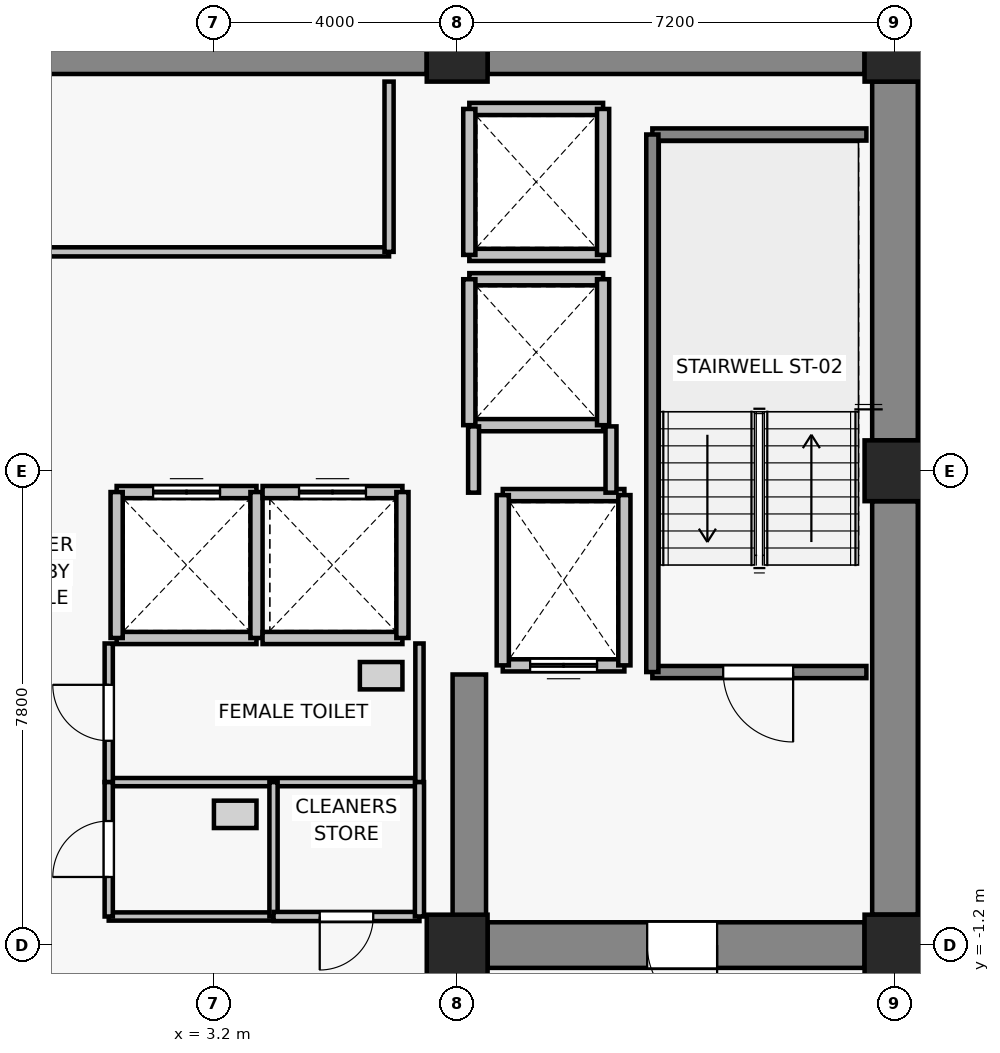
"""IFC4 building model, lengths in metres.
Left out: names, types, materials, properties, quantities, classifications, styles, units other than length and angle.
Written with IfcOpenShell. Run it as: python <this file> out.ifc"""

import sys

from ifc_helpers import new_model, si_unit, direction, frame, frame_2d, origin, origin_2d, place, context, subcontext, project, spatial, rectangle, extrude, source, transform, mapped, element, fill, save


model = new_model("IFC4")
c1 = context("Model", 3, precision=1e-05, world=origin(), true_north=direction((0.0, 1.0)))
c2 = subcontext(c1, "Body", "Model", "MODEL_VIEW")
j1 = project(units=[si_unit("LENGTHUNIT", "METRE"), si_unit("PLANEANGLEUNIT", "RADIAN")], contexts=[c1])
p1 = place(None, origin())
s1 = spatial("IfcSite", under=j1, at=p1, CompositionType="ELEMENT")
p2 = place(p1, origin())
s2 = spatial("IfcBuilding", under=s1, at=p2, CompositionType="ELEMENT")
p3 = place(p2, frame((0.0, 0.0, 185.8)))
s3 = spatial("IfcBuildingStorey", under=s2, at=p3, CompositionType="ELEMENT", Elevation=185.8)
for number, where, z_axis, x_axis in (
    (1, (7.2, -1.2, 0.0), (0.0, 0.0, 1.0), (1.0, 0.0, 0.0)),
    (2, (14.4, -1.2, 0.0), (0.0, 0.0, 1.0), (1.0, 0.0, 0.0)),
    (3, (14.4, 6.6, 0.0), (0.0, 0.0, 1.0), (1.0, 0.0, 0.0)),
    (4, (7.2, 13.5, 0.0), (0.0, 0.0, 1.0), (1.0, 0.0, 0.0)),
    (5, (14.4, 13.5, 0.0), (0.0, 0.0, 1.0), (1.0, 0.0, 0.0)),
):
    element("IfcColumn", number, at=place(p3, frame(where, z_axis=z_axis, x_axis=x_axis)), inside=s3, PredefinedType="COLUMN", context=c2, shape_type="SweptSolid", body=[
        extrude(rectangle(XDim=1.0, YDim=1.0, at=origin_2d()), origin(), (0.0, 0.0, 1.0), 3.3),
    ])
p4 = place(p3, frame((-6.7, 13.5, 0.0), z_axis=(0.0, 0.0, 1.0), x_axis=(1.0, 0.0, 0.0)))
e6 = element("IfcWall", 6, at=p4, inside=s3, PredefinedType="SHEAR", context=c2, shape_type="SweptSolid", body=[
    extrude(rectangle(XDim=13.4, YDim=0.75, at=frame_2d((6.7, 0.0))), origin(), (0.0, 0.0, 1.0), 3.075),
])
p5 = place(p3, frame((7.7, 13.5, 0.0), z_axis=(0.0, 0.0, 1.0), x_axis=(1.0, 0.0, 0.0)))
e7 = element("IfcWall", 7, at=p5, inside=s3, PredefinedType="SHEAR", context=c2, shape_type="SweptSolid", body=[
    extrude(rectangle(XDim=6.2, YDim=0.75, at=frame_2d((3.1, 0.0))), origin(), (0.0, 0.0, 1.0), 3.075),
])
p6 = place(p3, frame((14.4, -0.7, 0.0), z_axis=(0.0, 0.0, 1.0), x_axis=(0.0, 1.0, 0.0)))
e8 = element("IfcWall", 8, at=p6, inside=s3, PredefinedType="SHEAR", context=c2, shape_type="SweptSolid", body=[
    extrude(rectangle(XDim=6.8, YDim=0.75, at=frame_2d((3.4, 0.0))), origin(), (0.0, 0.0, 1.0), 3.075),
])
p7 = place(p3, frame((14.4, 7.1, 0.0), z_axis=(0.0, 0.0, 1.0), x_axis=(0.0, 1.0, 0.0)))
e9 = element("IfcWall", 9, at=p7, inside=s3, PredefinedType="SHEAR", context=c2, shape_type="SweptSolid", body=[
    extrude(rectangle(XDim=5.9, YDim=0.75, at=frame_2d((2.95, 0.0))), origin(), (0.0, 0.0, 1.0), 3.075),
])
p8 = place(p3, frame((13.9, -1.2, 0.0), z_axis=(0.0, 0.0, 1.0), x_axis=(-1.0, 0.0, 0.0)))
e10 = element("IfcWall", 10, at=p8, inside=s3, PredefinedType="SHEAR", context=c2, shape_type="SweptSolid", body=[
    extrude(rectangle(XDim=6.2, YDim=0.75, at=frame_2d((3.1, 0.0))), origin(), (0.0, 0.0, 1.0), 3.075),
])
p9 = place(p8, frame((2.425, 0.0, 0.0)))
e11 = element("IfcOpeningElement", 11, at=p9, cuts=e10, PredefinedType="OPENING", context=c2, shape_type="SweptSolid", body=[
    extrude(rectangle(XDim=1.15, YDim=2.15, at=frame_2d((0.575, 1.075))), frame((0.0, 0.385, 0.0), z_axis=(0.0, -1.0, 0.0), x_axis=(1.0, 0.0, 0.0)), (0.0, 0.0, 1.0), 0.77),
])
p10 = place(p3, frame((7.4, -0.825, 0.0), z_axis=(0.0, 0.0, 1.0), x_axis=(0.0, 1.0, 0.0)))
e12 = element("IfcWall", 12, at=p10, inside=s3, PredefinedType="SHEAR", context=c2, shape_type="SweptSolid", body=[
    extrude(rectangle(XDim=4.075, YDim=0.55, at=frame_2d((2.038, 0.0))), origin(), (0.0, 0.0, 1.0), 3.075),
])
p11 = place(p3, frame((9.95, 3.4, 0.0), z_axis=(0.0, 0.0, 1.0), x_axis=(-1.0, 0.0, 0.0)))
e13 = element("IfcWall", 13, at=p11, inside=s3, PredefinedType="SOLIDWALL", context=c2, shape_type="SweptSolid", body=[
    extrude(rectangle(XDim=2.0, YDim=0.2, at=frame_2d((1.0, 0.0))), origin(), (0.0, 0.0, 1.0), 3.075),
])
p12 = place(p11, frame((0.45, 0.0, 0.0)))
e14 = element("IfcOpeningElement", 14, at=p12, cuts=e13, PredefinedType="OPENING", context=c2, shape_type="SweptSolid", body=[
    extrude(rectangle(XDim=1.1, YDim=2.2, at=frame_2d((0.55, 1.1))), frame((0.0, 0.11, 0.0), z_axis=(0.0, -1.0, 0.0), x_axis=(1.0, 0.0, 0.0)), (0.0, 0.0, 1.0), 0.22),
])
p13 = place(p3, frame((7.95, 6.2, 0.0), z_axis=(0.0, 0.0, 1.0), x_axis=(1.0, 0.0, 0.0)))
e15 = element("IfcWall", 15, at=p13, inside=s3, PredefinedType="SOLIDWALL", context=c2, shape_type="SweptSolid", body=[
    extrude(rectangle(XDim=2.0, YDim=0.2, at=frame_2d((1.0, 0.0))), origin(), (0.0, 0.0, 1.0), 3.075),
])
for number, where, z_axis, x_axis in (
    (16, (7.95, 3.4, 0.0), (0.0, 0.0, 1.0), (0.0, 1.0, 0.0)),
    (17, (9.95, 6.2, 0.0), (0.0, 0.0, 1.0), (0.0, -1.0, 0.0)),
):
    element("IfcWall", number, at=place(p3, frame(where, z_axis=z_axis, x_axis=x_axis)), inside=s3, PredefinedType="SOLIDWALL", context=c2, shape_type="SweptSolid", body=[
        extrude(rectangle(XDim=2.8, YDim=0.2, at=frame_2d((1.4, 0.0))), origin(), (0.0, 0.0, 1.0), 3.075),
    ])
p14 = place(p3, frame((3.9, 3.85, 0.0), z_axis=(0.0, 0.0, 1.0), x_axis=(-1.0, 0.0, 0.0)))
e18 = element("IfcWall", 18, at=p14, inside=s3, PredefinedType="SOLIDWALL", context=c2, shape_type="SweptSolid", body=[
    extrude(rectangle(XDim=2.3, YDim=0.2, at=frame_2d((1.15, 0.0))), origin(), (0.0, 0.0, 1.0), 3.075),
])
p15 = place(p3, frame((1.6, 6.25, 0.0), z_axis=(0.0, 0.0, 1.0), x_axis=(1.0, 0.0, 0.0)))
e19 = element("IfcWall", 19, at=p15, inside=s3, PredefinedType="SOLIDWALL", context=c2, shape_type="SweptSolid", body=[
    extrude(rectangle(XDim=2.3, YDim=0.2, at=frame_2d((1.15, 0.0))), origin(), (0.0, 0.0, 1.0), 3.075),
])
p16 = place(p15, frame((0.6, 0.0, 0.0)))
e20 = element("IfcOpeningElement", 20, at=p16, cuts=e19, PredefinedType="OPENING", context=c2, shape_type="SweptSolid", body=[
    extrude(rectangle(XDim=1.1, YDim=2.2, at=frame_2d((0.55, 1.1))), frame((0.0, 0.11, 0.0), z_axis=(0.0, -1.0, 0.0), x_axis=(1.0, 0.0, 0.0)), (0.0, 0.0, 1.0), 0.22),
])
for number, where, z_axis, x_axis in (
    (21, (1.6, 3.85, 0.0), (0.0, 0.0, 1.0), (0.0, 1.0, 0.0)),
    (22, (3.9, 6.25, 0.0), (0.0, 0.0, 1.0), (0.0, -1.0, 0.0)),
):
    element("IfcWall", number, at=place(p3, frame(where, z_axis=z_axis, x_axis=x_axis)), inside=s3, PredefinedType="SOLIDWALL", context=c2, shape_type="SweptSolid", body=[
        extrude(rectangle(XDim=2.4, YDim=0.2, at=frame_2d((1.2, 0.0))), origin(), (0.0, 0.0, 1.0), 3.075),
    ])
p17 = place(p3, frame((6.3, 3.85, 0.0), z_axis=(0.0, 0.0, 1.0), x_axis=(-1.0, 0.0, 0.0)))
e23 = element("IfcWall", 23, at=p17, inside=s3, PredefinedType="SOLIDWALL", context=c2, shape_type="SweptSolid", body=[
    extrude(rectangle(XDim=2.3, YDim=0.2, at=frame_2d((1.15, 0.0))), origin(), (0.0, 0.0, 1.0), 3.075),
])
p18 = place(p3, frame((4.0, 6.25, 0.0), z_axis=(0.0, 0.0, 1.0), x_axis=(1.0, 0.0, 0.0)))
e24 = element("IfcWall", 24, at=p18, inside=s3, PredefinedType="SOLIDWALL", context=c2, shape_type="SweptSolid", body=[
    extrude(rectangle(XDim=2.3, YDim=0.2, at=frame_2d((1.15, 0.0))), origin(), (0.0, 0.0, 1.0), 3.075),
])
p19 = place(p18, frame((0.6, 0.0, 0.0)))
e25 = element("IfcOpeningElement", 25, at=p19, cuts=e24, PredefinedType="OPENING", context=c2, shape_type="SweptSolid", body=[
    extrude(rectangle(XDim=1.1, YDim=2.2, at=frame_2d((0.55, 1.1))), frame((0.0, 0.11, 0.0), z_axis=(0.0, -1.0, 0.0), x_axis=(1.0, 0.0, 0.0)), (0.0, 0.0, 1.0), 0.22),
])
p20 = place(p3, frame((6.3, 6.25, 0.0), z_axis=(0.0, 0.0, 1.0), x_axis=(0.0, -1.0, 0.0)))
e26 = element("IfcWall", 26, at=p20, inside=s3, PredefinedType="SOLIDWALL", context=c2, shape_type="SweptSolid", body=[
    extrude(rectangle(XDim=2.4, YDim=0.2, at=frame_2d((1.2, 0.0))), origin(), (0.0, 0.0, 1.0), 3.075),
])
for number, where, z_axis, x_axis in (
    (27, (9.6, 7.35, 0.0), (0.0, 0.0, 1.0), (-1.0, 0.0, 0.0)),
    (28, (7.4, 9.75, 0.0), (0.0, 0.0, 1.0), (1.0, 0.0, 0.0)),
):
    element("IfcWall", number, at=place(p3, frame(where, z_axis=z_axis, x_axis=x_axis)), inside=s3, PredefinedType="SOLIDWALL", context=c2, shape_type="SweptSolid", body=[
        extrude(rectangle(XDim=2.2, YDim=0.2, at=frame_2d((1.1, 0.0))), origin(), (0.0, 0.0, 1.0), 2.565),
    ])
p21 = place(p3, frame((7.4, 7.35, 0.0), z_axis=(0.0, 0.0, 1.0), x_axis=(0.0, 1.0, 0.0)))
e29 = element("IfcWall", 29, at=p21, inside=s3, PredefinedType="SOLIDWALL", context=c2, shape_type="SweptSolid", body=[
    extrude(rectangle(XDim=2.4, YDim=0.2, at=frame_2d((1.2, 0.0))), origin(), (0.0, 0.0, 1.0), 2.565),
])
p22 = place(p3, frame((9.6, 9.75, 0.0), z_axis=(0.0, 0.0, 1.0), x_axis=(0.0, -1.0, 0.0)))
e30 = element("IfcWall", 30, at=p22, inside=s3, PredefinedType="SOLIDWALL", context=c2, shape_type="SweptSolid", body=[
    extrude(rectangle(XDim=2.4, YDim=0.2, at=frame_2d((1.2, 0.0))), origin(), (0.0, 0.0, 1.0), 3.075),
])
for number, where, z_axis, x_axis in (
    (31, (9.6, 10.15, 0.0), (0.0, 0.0, 1.0), (-1.0, 0.0, 0.0)),
    (32, (7.4, 12.55, 0.0), (0.0, 0.0, 1.0), (1.0, 0.0, 0.0)),
):
    element("IfcWall", number, at=place(p3, frame(where, z_axis=z_axis, x_axis=x_axis)), inside=s3, PredefinedType="SOLIDWALL", context=c2, shape_type="SweptSolid", body=[
        extrude(rectangle(XDim=2.2, YDim=0.2, at=frame_2d((1.1, 0.0))), origin(), (0.0, 0.0, 1.0), 2.565),
    ])
p23 = place(p3, frame((7.4, 10.15, 0.0), z_axis=(0.0, 0.0, 1.0), x_axis=(0.0, 1.0, 0.0)))
e33 = element("IfcWall", 33, at=p23, inside=s3, PredefinedType="SOLIDWALL", context=c2, shape_type="SweptSolid", body=[
    extrude(rectangle(XDim=2.4, YDim=0.2, at=frame_2d((1.2, 0.0))), origin(), (0.0, 0.0, 1.0), 2.565),
])
p24 = place(p3, frame((9.6, 12.55, 0.0), z_axis=(0.0, 0.0, 1.0), x_axis=(0.0, -1.0, 0.0)))
e34 = element("IfcWall", 34, at=p24, inside=s3, PredefinedType="SOLIDWALL", context=c2, shape_type="SweptSolid", body=[
    extrude(rectangle(XDim=2.4, YDim=0.2, at=frame_2d((1.2, 0.0))), origin(), (0.0, 0.0, 1.0), 3.075),
])
p25 = place(p3, frame((13.93, 3.29, 0.0), z_axis=(0.0, 0.0, 1.0), x_axis=(-1.0, 0.0, 0.0)))
e35 = element("IfcWall", 35, at=p25, inside=s3, PredefinedType="SOLIDWALL", context=c2, shape_type="SweptSolid", body=[
    extrude(rectangle(XDim=3.52, YDim=0.2, at=frame_2d((1.76, 0.0))), origin(), (0.0, 0.0, 1.0), 3.075),
])
p26 = place(p25, frame((1.205, 0.0, 0.0)))
e36 = element("IfcOpeningElement", 36, at=p26, cuts=e35, PredefinedType="OPENING", context=c2, shape_type="SweptSolid", body=[
    extrude(rectangle(XDim=1.15, YDim=2.15, at=frame_2d((0.575, 1.075))), frame((0.0, 0.11, 0.0), z_axis=(0.0, -1.0, 0.0), x_axis=(1.0, 0.0, 0.0)), (0.0, 0.0, 1.0), 0.22),
])
p27 = place(p3, frame((10.41, 12.13, 0.0), z_axis=(0.0, 0.0, 1.0), x_axis=(1.0, 0.0, 0.0)))
e37 = element("IfcWall", 37, at=p27, inside=s3, PredefinedType="SOLIDWALL", context=c2, shape_type="SweptSolid", body=[
    extrude(rectangle(XDim=3.52, YDim=0.2, at=frame_2d((1.76, 0.0))), origin(), (0.0, 0.0, 1.0), 3.075),
])
p28 = place(p3, frame((10.41, 3.29, 0.0), z_axis=(0.0, 0.0, 1.0), x_axis=(0.0, 1.0, 0.0)))
e38 = element("IfcWall", 38, at=p28, inside=s3, PredefinedType="SOLIDWALL", context=c2, shape_type="SweptSolid", body=[
    extrude(rectangle(XDim=8.84, YDim=0.2, at=frame_2d((4.42, 0.0))), origin(), (0.0, 0.0, 1.0), 3.075),
])
p29 = place(p3, frame((7.47, 6.24, 0.0), z_axis=(0.0, 0.0, 1.0), x_axis=(0.0, 1.0, 0.0)))
e39 = element("IfcWall", 39, at=p29, inside=s3, PredefinedType="PARTITIONING", context=c2, shape_type="SweptSolid", body=[
    extrude(rectangle(XDim=1.09, YDim=0.18, at=frame_2d((0.545, 0.0))), origin(), (0.0, 0.0, 1.0), 2.565),
])
p30 = place(p3, frame((9.73, 7.33, 0.0), z_axis=(0.0, 0.0, 1.0), x_axis=(0.0, -1.0, 0.0)))
e40 = element("IfcWall", 40, at=p30, inside=s3, PredefinedType="PARTITIONING", context=c2, shape_type="SweptSolid", body=[
    extrude(rectangle(XDim=1.09, YDim=0.18, at=frame_2d((0.545, 0.0))), origin(), (0.0, 0.0, 1.0), 3.075),
])
p31 = place(p3, frame((6.08, 10.2, 0.0), z_axis=(0.0, 0.0, 1.0), x_axis=(-1.0, 0.0, 0.0)))
e41 = element("IfcWall", 41, at=p31, inside=s3, PredefinedType="PARTITIONING", context=c2, shape_type="SweptSolid", body=[
    extrude(rectangle(XDim=12.16, YDim=0.15, at=frame_2d((6.08, 0.0))), origin(), (0.0, 0.0, 1.0), 3.075),
])
p32 = place(p31, frame((7.005, 0.0, 0.0)))
e42 = element("IfcOpeningElement", 42, at=p32, cuts=e41, PredefinedType="OPENING", context=c2, shape_type="SweptSolid", body=[
    extrude(rectangle(XDim=1.15, YDim=2.15, at=frame_2d((0.575, 1.075))), frame((0.0, 0.085, 0.0), z_axis=(0.0, -1.0, 0.0), x_axis=(1.0, 0.0, 0.0)), (0.0, 0.0, 1.0), 0.17),
])
p33 = place(p3, frame((6.08, 13.0, 0.0), z_axis=(0.0, 0.0, 1.0), x_axis=(0.0, -1.0, 0.0)))
e43 = element("IfcWall", 43, at=p33, inside=s3, PredefinedType="PARTITIONING", context=c2, shape_type="SweptSolid", body=[
    extrude(rectangle(XDim=2.8, YDim=0.15, at=frame_2d((1.4, 0.0))), origin(), (0.0, 0.0, 1.0), 3.075),
])
p34 = place(p3, frame((6.58, 1.48, 0.0), z_axis=(0.0, 0.0, 1.0), x_axis=(-1.0, 0.0, 0.0)))
e44 = element("IfcWall", 44, at=p34, inside=s3, PredefinedType="PARTITIONING", context=c2, shape_type="SweptSolid", body=[
    extrude(rectangle(XDim=5.11, YDim=0.135, at=frame_2d((2.555, 0.0))), origin(), (0.0, 0.0, 1.0), 3.075),
])
p35 = place(p3, frame((1.47, 1.48, 0.0), z_axis=(0.0, 0.0, 1.0), x_axis=(0.0, 1.0, 0.0)))
e45 = element("IfcWall", 45, at=p35, inside=s3, PredefinedType="PARTITIONING", context=c2, shape_type="SweptSolid", body=[
    extrude(rectangle(XDim=2.28, YDim=0.135, at=frame_2d((1.14, 0.0))), origin(), (0.0, 0.0, 1.0), 3.075),
])
p36 = place(p35, frame((0.68, 0.0, 0.0)))
e46 = element("IfcOpeningElement", 46, at=p36, cuts=e45, PredefinedType="OPENING", context=c2, shape_type="SweptSolid", body=[
    extrude(rectangle(XDim=0.92, YDim=2.1, at=frame_2d((0.46, 1.05))), frame((0.0, 0.077, 0.0), z_axis=(0.0, -1.0, 0.0), x_axis=(1.0, 0.0, 0.0)), (0.0, 0.0, 1.0), 0.155),
])
p37 = place(p3, frame((6.58, 3.76, 0.0), z_axis=(0.0, 0.0, 1.0), x_axis=(0.0, -1.0, 0.0)))
e47 = element("IfcWall", 47, at=p37, inside=s3, PredefinedType="PARTITIONING", context=c2, shape_type="SweptSolid", body=[
    extrude(rectangle(XDim=2.28, YDim=0.135, at=frame_2d((1.14, 0.0))), origin(), (0.0, 0.0, 1.0), 3.075),
])
p38 = place(p3, frame((4.18, -0.73, 0.0), z_axis=(0.0, 0.0, 1.0), x_axis=(-1.0, 0.0, 0.0)))
e48 = element("IfcWall", 48, at=p38, inside=s3, PredefinedType="PARTITIONING", context=c2, shape_type="SweptSolid", body=[
    extrude(rectangle(XDim=2.71, YDim=0.135, at=frame_2d((1.355, 0.0))), origin(), (0.0, 0.0, 1.0), 3.075),
])
p39 = place(p3, frame((1.47, -0.73, 0.0), z_axis=(0.0, 0.0, 1.0), x_axis=(0.0, 1.0, 0.0)))
e49 = element("IfcWall", 49, at=p39, inside=s3, PredefinedType="PARTITIONING", context=c2, shape_type="SweptSolid", body=[
    extrude(rectangle(XDim=2.21, YDim=0.135, at=frame_2d((1.105, 0.0))), origin(), (0.0, 0.0, 1.0), 3.075),
])
p40 = place(p39, frame((0.65, 0.0, 0.0)))
e50 = element("IfcOpeningElement", 50, at=p40, cuts=e49, PredefinedType="OPENING", context=c2, shape_type="SweptSolid", body=[
    extrude(rectangle(XDim=0.92, YDim=2.1, at=frame_2d((0.46, 1.05))), frame((0.0, 0.077, 0.0), z_axis=(0.0, -1.0, 0.0), x_axis=(1.0, 0.0, 0.0)), (0.0, 0.0, 1.0), 0.155),
])
p41 = place(p3, frame((4.18, 1.48, 0.0), z_axis=(0.0, 0.0, 1.0), x_axis=(0.0, -1.0, 0.0)))
e51 = element("IfcWall", 51, at=p41, inside=s3, PredefinedType="PARTITIONING", context=c2, shape_type="SweptSolid", body=[
    extrude(rectangle(XDim=2.21, YDim=0.135, at=frame_2d((1.105, 0.0))), origin(), (0.0, 0.0, 1.0), 3.075),
])
p42 = place(p3, frame((6.58, -0.73, 0.0), z_axis=(0.0, 0.0, 1.0), x_axis=(-1.0, 0.0, 0.0)))
e52 = element("IfcWall", 52, at=p42, inside=s3, PredefinedType="PARTITIONING", context=c2, shape_type="SweptSolid", body=[
    extrude(rectangle(XDim=2.4, YDim=0.15, at=frame_2d((1.2, 0.0))), origin(), (0.0, 0.0, 1.0), 3.075),
])
p43 = place(p42, frame((0.76, 0.0, 0.0)))
e53 = element("IfcOpeningElement", 53, at=p43, cuts=e52, PredefinedType="OPENING", context=c2, shape_type="SweptSolid", body=[
    extrude(rectangle(XDim=0.88, YDim=2.1, at=frame_2d((0.44, 1.05))), frame((0.0, 0.085, 0.0), z_axis=(0.0, -1.0, 0.0), x_axis=(1.0, 0.0, 0.0)), (0.0, 0.0, 1.0), 0.17),
])
p44 = place(p3, frame((6.58, 1.48, 0.0), z_axis=(0.0, 0.0, 1.0), x_axis=(0.0, -1.0, 0.0)))
e54 = element("IfcWall", 54, at=p44, inside=s3, PredefinedType="PARTITIONING", context=c2, shape_type="SweptSolid", body=[
    extrude(rectangle(XDim=2.21, YDim=0.15, at=frame_2d((1.105, 0.0))), origin(), (0.0, 0.0, 1.0), 3.075),
])
m1 = source(origin(), c2, "Body", "SweptSolid", [
    extrude(rectangle(XDim=1.1, YDim=2.2, at=frame_2d((0.55, 1.1))), frame((0.0, 0.025, 0.0), z_axis=(0.0, -1.0, 0.0), x_axis=(1.0, 0.0, 0.0)), (0.0, 0.0, 1.0), 0.05),
])
p45 = place(p12, origin())
e55 = element("IfcDoor", 55, at=p45, inside=s3, OperationType="DOUBLE_DOOR_SLIDING", PredefinedType="DOOR", context=c2, shape_type="MappedRepresentation", body=[
    mapped(m1, transform((0.0, 0.0, 0.0), x_axis=(1.0, 0.0, 0.0), y_axis=(0.0, 1.0, 0.0), z_axis=(0.0, 0.0, 1.0), scale=1.0)),
])
fill(e14, e55)
p46 = place(p16, origin())
e56 = element("IfcDoor", 56, at=p46, inside=s3, OperationType="DOUBLE_DOOR_SLIDING", PredefinedType="DOOR", context=c2, shape_type="MappedRepresentation", body=[
    mapped(m1, transform((0.0, 0.0, 0.0), x_axis=(1.0, 0.0, 0.0), y_axis=(0.0, 1.0, 0.0), z_axis=(0.0, 0.0, 1.0), scale=1.0)),
])
fill(e20, e56)
p47 = place(p19, origin())
e57 = element("IfcDoor", 57, at=p47, inside=s3, OperationType="DOUBLE_DOOR_SLIDING", PredefinedType="DOOR", context=c2, shape_type="MappedRepresentation", body=[
    mapped(m1, transform((0.0, 0.0, 0.0), x_axis=(1.0, 0.0, 0.0), y_axis=(0.0, 1.0, 0.0), z_axis=(0.0, 0.0, 1.0), scale=1.0)),
])
fill(e25, e57)
m2 = source(origin(), c2, "Body", "SweptSolid", [
    extrude(rectangle(XDim=1.15, YDim=2.15, at=frame_2d((0.575, 1.075))), frame((0.0, 0.025, 0.0), z_axis=(0.0, -1.0, 0.0), x_axis=(1.0, 0.0, 0.0)), (0.0, 0.0, 1.0), 0.05),
])
p48 = place(p26, origin())
e58 = element("IfcDoor", 58, at=p48, inside=s3, OperationType="SINGLE_SWING_LEFT", PredefinedType="DOOR", context=c2, shape_type="MappedRepresentation", body=[
    mapped(m2, transform((0.0, 0.0, 0.0), x_axis=(1.0, 0.0, 0.0), y_axis=(0.0, 1.0, 0.0), z_axis=(0.0, 0.0, 1.0), scale=1.0)),
])
fill(e36, e58)
p49 = place(p9, origin())
e59 = element("IfcDoor", 59, at=p49, inside=s3, OperationType="SINGLE_SWING_LEFT", PredefinedType="DOOR", context=c2, shape_type="MappedRepresentation", body=[
    mapped(m2, transform((0.0, 0.0, 0.0), x_axis=(1.0, 0.0, 0.0), y_axis=(0.0, 1.0, 0.0), z_axis=(0.0, 0.0, 1.0), scale=1.0)),
])
fill(e11, e59)
m3 = source(origin(), c2, "Body", "SweptSolid", [
    extrude(rectangle(XDim=0.92, YDim=2.1, at=frame_2d((0.46, 1.05))), frame((0.0, 0.025, 0.0), z_axis=(0.0, -1.0, 0.0), x_axis=(1.0, 0.0, 0.0)), (0.0, 0.0, 1.0), 0.05),
])
p50 = place(p36, origin())
e60 = element("IfcDoor", 60, at=p50, inside=s3, OperationType="SINGLE_SWING_RIGHT", PredefinedType="DOOR", context=c2, shape_type="MappedRepresentation", body=[
    mapped(m3, transform((0.0, 0.0, 0.0), x_axis=(1.0, 0.0, 0.0), y_axis=(0.0, 1.0, 0.0), z_axis=(0.0, 0.0, 1.0), scale=1.0)),
])
fill(e46, e60)
p51 = place(p40, origin())
e61 = element("IfcDoor", 61, at=p51, inside=s3, OperationType="SINGLE_SWING_LEFT", PredefinedType="DOOR", context=c2, shape_type="MappedRepresentation", body=[
    mapped(m3, transform((0.0, 0.0, 0.0), x_axis=(1.0, 0.0, 0.0), y_axis=(0.0, 1.0, 0.0), z_axis=(0.0, 0.0, 1.0), scale=1.0)),
])
fill(e50, e61)
m4 = source(origin(), c2, "Body", "SweptSolid", [
    extrude(rectangle(XDim=0.88, YDim=2.1, at=frame_2d((0.44, 1.05))), frame((0.0, 0.025, 0.0), z_axis=(0.0, -1.0, 0.0), x_axis=(1.0, 0.0, 0.0)), (0.0, 0.0, 1.0), 0.05),
])
p52 = place(p43, origin())
e62 = element("IfcDoor", 62, at=p52, inside=s3, OperationType="SINGLE_SWING_RIGHT", PredefinedType="DOOR", context=c2, shape_type="MappedRepresentation", body=[
    mapped(m4, transform((0.0, 0.0, 0.0), x_axis=(1.0, 0.0, 0.0), y_axis=(0.0, 1.0, 0.0), z_axis=(0.0, 0.0, 1.0), scale=1.0)),
])
fill(e53, e62)
save(model, sys.argv[1])
